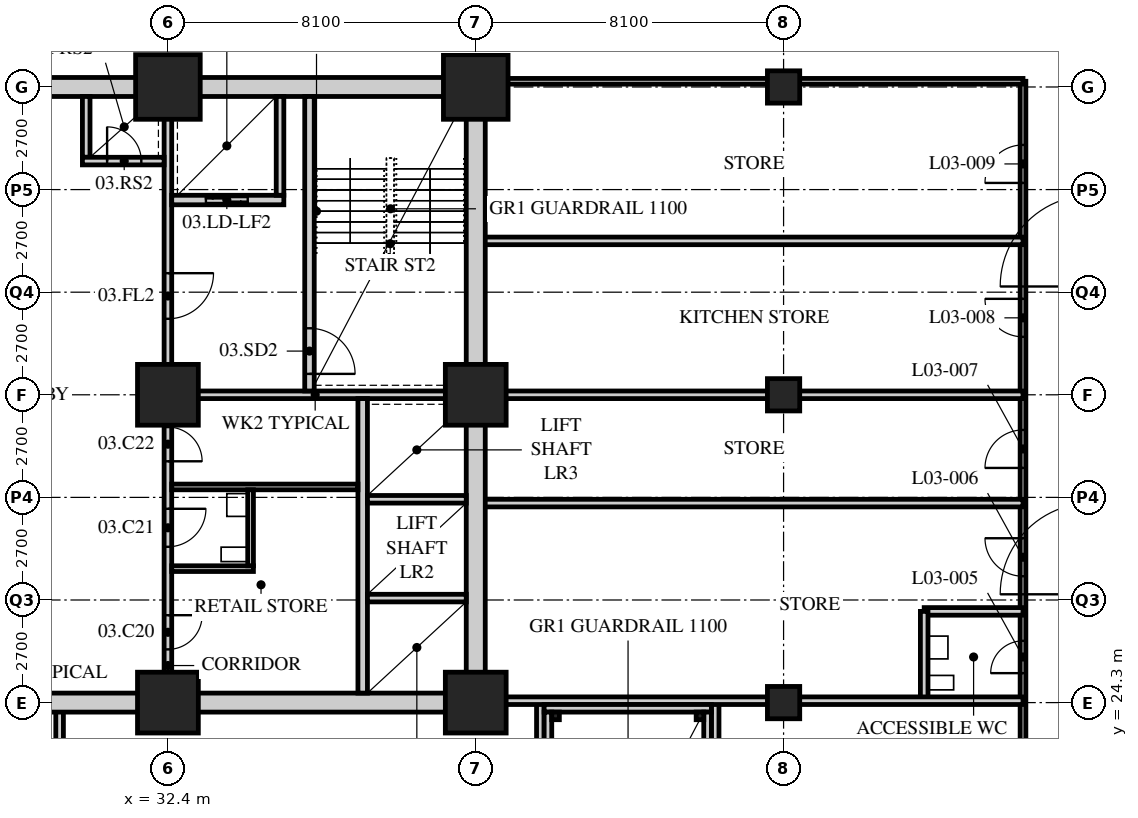
"""IFC4 building model, lengths in metres.
Left out: names, types, materials, properties, quantities, classifications, styles, units other than length and angle.
Written with IfcOpenShell. Run it as: python <this file> out.ifc"""

import sys

from ifc_helpers import new_model, si_unit, direction, frame, frame_2d, origin, origin_2d, place, context, subcontext, project, spatial, rectangle, hollow_rectangle, extrude, element, fill, save


model = new_model("IFC4")
c1 = context("Model", 3, precision=1e-05, world=origin(), true_north=direction((0.0, 1.0)))
c2 = subcontext(c1, "Body", "Model", "MODEL_VIEW")
j1 = project(units=[si_unit("LENGTHUNIT", "METRE"), si_unit("PLANEANGLEUNIT", "RADIAN")], contexts=[c1])
p1 = place(None, origin())
s1 = spatial("IfcSite", under=j1, at=p1, CompositionType="ELEMENT")
p2 = place(p1, origin())
s2 = spatial("IfcBuilding", under=s1, at=p2, CompositionType="ELEMENT")
p3 = place(p2, frame((0.0, 0.0, 16.8)))
s3 = spatial("IfcBuildingStorey", under=s2, at=p3, CompositionType="ELEMENT", Elevation=16.8)
for number, where, z_axis, x_axis in (
    (1, (32.4, 24.3, 0.0), (0.0, 0.0, 1.0), (1.0, 0.0, 0.0)),
    (2, (32.4, 32.4, 0.0), (0.0, 0.0, 1.0), (1.0, 0.0, 0.0)),
):
    element("IfcColumn", number, at=place(p3, frame(where, z_axis=z_axis, x_axis=x_axis)), inside=s3, PredefinedType="COLUMN", context=c2, shape_type="SweptSolid", body=[
        extrude(hollow_rectangle(XDim=1.6, YDim=1.6, WallThickness=0.15, at=origin_2d()), origin(), (0.0, 0.0, 1.0), 5.4),
    ])
p4 = place(p3, frame((32.4, 40.5, 0.0), z_axis=(0.0, 0.0, 1.0), x_axis=(1.0, 0.0, 0.0)))
e3 = element("IfcColumn", 3, at=p4, inside=s3, PredefinedType="COLUMN", context=c2, shape_type="SweptSolid", body=[
    extrude(hollow_rectangle(XDim=1.7, YDim=1.7, WallThickness=0.16, at=origin_2d()), origin(), (0.0, 0.0, 1.0), 5.4),
])
for number, where, z_axis, x_axis in (
    (4, (40.5, 24.3, 0.0), (0.0, 0.0, 1.0), (1.0, 0.0, 0.0)),
    (5, (40.5, 32.4, 0.0), (0.0, 0.0, 1.0), (1.0, 0.0, 0.0)),
):
    element("IfcColumn", number, at=place(p3, frame(where, z_axis=z_axis, x_axis=x_axis)), inside=s3, PredefinedType="COLUMN", context=c2, shape_type="SweptSolid", body=[
        extrude(hollow_rectangle(XDim=1.6, YDim=1.6, WallThickness=0.15, at=origin_2d()), origin(), (0.0, 0.0, 1.0), 5.4),
    ])
p5 = place(p3, frame((40.5, 40.5, 0.0), z_axis=(0.0, 0.0, 1.0), x_axis=(1.0, 0.0, 0.0)))
e6 = element("IfcColumn", 6, at=p5, inside=s3, PredefinedType="COLUMN", context=c2, shape_type="SweptSolid", body=[
    extrude(hollow_rectangle(XDim=1.7, YDim=1.7, WallThickness=0.16, at=origin_2d()), origin(), (0.0, 0.0, 1.0), 5.4),
])
for number, where, z_axis, x_axis in (
    (7, (48.6, 24.3, 0.0), (0.0, 0.0, 1.0), (1.0, 0.0, 0.0)),
    (8, (48.6, 32.4, 0.0), (0.0, 0.0, 1.0), (1.0, 0.0, 0.0)),
    (9, (48.6, 40.5, 0.0), (0.0, 0.0, 1.0), (1.0, 0.0, 0.0)),
):
    element("IfcColumn", number, at=place(p3, frame(where, z_axis=z_axis, x_axis=x_axis)), inside=s3, PredefinedType="COLUMN", context=c2, shape_type="SweptSolid", body=[
        extrude(hollow_rectangle(XDim=0.85, YDim=0.85, WallThickness=0.085, at=origin_2d()), origin(), (0.0, 0.0, 1.0), 5.4),
    ])
p6 = place(p3, frame((54.9, 9.9, 0.0), z_axis=(0.0, 0.0, 1.0), x_axis=(0.0, 1.0, 0.0)))
e10 = element("IfcWall", 10, at=p6, inside=s3, PredefinedType="PARTITIONING", context=c2, shape_type="SweptSolid", body=[
    extrude(rectangle(XDim=30.75, YDim=0.15, at=frame_2d((15.375, 0.0))), origin(), (0.0, 0.0, 1.0), 5.15),
])
p7 = place(p6, frame((15.175, 0.0, 0.0)))
e11 = element("IfcOpeningElement", 11, at=p7, cuts=e10, PredefinedType="OPENING", context=c2, shape_type="SweptSolid", body=[
    extrude(rectangle(XDim=0.85, YDim=2.1, at=frame_2d((0.425, 1.05))), frame((0.0, 0.085, 0.0), z_axis=(0.0, -1.0, 0.0), x_axis=(1.0, 0.0, 0.0)), (0.0, 0.0, 1.0), 0.17),
])
p8 = place(p6, frame((17.725, 0.0, 0.0)))
e12 = element("IfcOpeningElement", 12, at=p8, cuts=e10, PredefinedType="OPENING", context=c2, shape_type="SweptSolid", body=[
    extrude(rectangle(XDim=1.0, YDim=2.1, at=frame_2d((0.5, 1.05))), frame((0.0, 0.085, 0.0), z_axis=(0.0, -1.0, 0.0), x_axis=(1.0, 0.0, 0.0)), (0.0, 0.0, 1.0), 0.17),
])
p9 = place(p6, frame((20.575, 0.0, 0.0)))
e13 = element("IfcOpeningElement", 13, at=p9, cuts=e10, PredefinedType="OPENING", context=c2, shape_type="SweptSolid", body=[
    extrude(rectangle(XDim=1.0, YDim=2.1, at=frame_2d((0.5, 1.05))), frame((0.0, 0.085, 0.0), z_axis=(0.0, -1.0, 0.0), x_axis=(1.0, 0.0, 0.0)), (0.0, 0.0, 1.0), 0.17),
])
p10 = place(p6, frame((24.025, 0.0, 0.0)))
e14 = element("IfcOpeningElement", 14, at=p10, cuts=e10, PredefinedType="OPENING", context=c2, shape_type="SweptSolid", body=[
    extrude(rectangle(XDim=1.0, YDim=2.1, at=frame_2d((0.5, 1.05))), frame((0.0, 0.085, 0.0), z_axis=(0.0, -1.0, 0.0), x_axis=(1.0, 0.0, 0.0)), (0.0, 0.0, 1.0), 0.17),
])
p11 = place(p6, frame((28.075, 0.0, 0.0)))
e15 = element("IfcOpeningElement", 15, at=p11, cuts=e10, PredefinedType="OPENING", context=c2, shape_type="SweptSolid", body=[
    extrude(rectangle(XDim=1.0, YDim=2.1, at=frame_2d((0.5, 1.05))), frame((0.0, 0.085, 0.0), z_axis=(0.0, -1.0, 0.0), x_axis=(1.0, 0.0, 0.0)), (0.0, 0.0, 1.0), 0.17),
])
p12 = place(p3, frame((54.9, 40.65, 0.0), z_axis=(0.0, 0.0, 1.0), x_axis=(-1.0, 0.0, 0.0)))
e16 = element("IfcWall", 16, at=p12, inside=s3, PredefinedType="PARTITIONING", context=c2, shape_type="SweptSolid", body=[
    extrude(rectangle(XDim=14.268, YDim=0.15, at=frame_2d((7.134, 0.0))), origin(), (0.0, 0.0, 1.0), 4.538),
])
p13 = place(p3, frame((40.5, 32.4, 0.0), z_axis=(0.0, 0.0, 1.0), x_axis=(1.0, 0.0, 0.0)))
e17 = element("IfcWall", 17, at=p13, inside=s3, PredefinedType="SOLIDWALL", context=c2, shape_type="SweptSolid", body=[
    extrude(rectangle(XDim=14.4, YDim=0.2, at=frame_2d((7.2, 0.0))), origin(), (0.0, 0.0, 1.0), 4.538),
])
p14 = place(p3, frame((54.9, 26.7, 0.0), z_axis=(0.0, 0.0, 1.0), x_axis=(-1.0, 0.0, 0.0)))
e18 = element("IfcWall", 18, at=p14, inside=s3, PredefinedType="SOLIDWALL", context=c2, shape_type="SweptSolid", body=[
    extrude(rectangle(XDim=2.6, YDim=0.2, at=frame_2d((1.3, 0.0))), origin(), (0.0, 0.0, 1.0), 5.15),
])
p15 = place(p3, frame((52.3, 24.3, 0.0), z_axis=(0.0, 0.0, 1.0), x_axis=(0.0, 1.0, 0.0)))
e19 = element("IfcWall", 19, at=p15, inside=s3, PredefinedType="SOLIDWALL", context=c2, shape_type="SweptSolid", body=[
    extrude(rectangle(XDim=2.4, YDim=0.2, at=frame_2d((1.2, 0.0))), origin(), (0.0, 0.0, 1.0), 5.15),
])
for number, where, z_axis, x_axis in (
    (20, (54.9, 29.55, 0.0), (0.0, 0.0, 1.0), (-1.0, 0.0, 0.0)),
    (21, (54.9, 36.45, 0.0), (0.0, 0.0, 1.0), (-1.0, 0.0, 0.0)),
):
    element("IfcWall", number, at=place(p3, frame(where, z_axis=z_axis, x_axis=x_axis)), inside=s3, PredefinedType="SOLIDWALL", context=c2, shape_type="SweptSolid", body=[
        extrude(rectangle(XDim=14.4, YDim=0.2, at=frame_2d((7.2, 0.0))), origin(), (0.0, 0.0, 1.0), 5.15),
    ])
for number, where, z_axis, x_axis in (
    (22, (42.2, 9.9, 0.0), (0.0, 0.0, 1.0), (0.0, 1.0, 0.0)),
    (23, (46.8, 9.9, 0.0), (0.0, 0.0, 1.0), (0.0, 1.0, 0.0)),
    (24, (29.55, 9.9, 0.0), (0.0, 0.0, 1.0), (0.0, 1.0, 0.0)),
):
    element("IfcWall", number, at=place(p3, frame(where, z_axis=z_axis, x_axis=x_axis)), inside=s3, PredefinedType="SOLIDWALL", context=c2, shape_type="SweptSolid", body=[
        extrude(rectangle(XDim=14.4, YDim=0.2, at=frame_2d((7.2, 0.0))), origin(), (0.0, 0.0, 1.0), 5.15),
    ])
p16 = place(p3, frame((40.5, 24.35, 0.0), z_axis=(0.0, 0.0, 1.0), x_axis=(1.0, 0.0, 0.0)))
e25 = element("IfcWall", 25, at=p16, inside=s3, PredefinedType="SOLIDWALL", context=c2, shape_type="SweptSolid", body=[
    extrude(rectangle(XDim=14.4, YDim=0.2, at=frame_2d((7.2, 0.0))), origin(), (0.0, 0.0, 1.0), 4.538),
])
p17 = place(p3, frame((15.95, 24.3, 0.0), z_axis=(0.0, 0.0, 1.0), x_axis=(1.0, 0.0, 0.0)))
e26 = element("IfcWall", 26, at=p17, inside=s3, PredefinedType="SOLIDWALL", context=c2, shape_type="SweptSolid", body=[
    extrude(rectangle(XDim=24.8, YDim=0.5, at=frame_2d((12.4, 0.0))), origin(), (0.0, 0.0, 1.0), 4.5),
])
p18 = place(p17, frame((11.5, 0.0, 0.0)))
e27 = element("IfcOpeningElement", 27, at=p18, cuts=e26, PredefinedType="OPENING", context=c2, shape_type="SweptSolid", body=[
    extrude(rectangle(XDim=1.8, YDim=2.4, at=frame_2d((0.9, 1.2))), frame((0.0, 0.26, 0.0), z_axis=(0.0, -1.0, 0.0), x_axis=(1.0, 0.0, 0.0)), (0.0, 0.0, 1.0), 0.52),
])
p19 = place(p3, frame((15.95, 40.5, 0.0), z_axis=(0.0, 0.0, 1.0), x_axis=(1.0, 0.0, 0.0)))
e28 = element("IfcWall", 28, at=p19, inside=s3, PredefinedType="SOLIDWALL", context=c2, shape_type="SweptSolid", body=[
    extrude(rectangle(XDim=24.8, YDim=0.5, at=frame_2d((12.4, 0.0))), origin(), (0.0, 0.0, 1.0), 4.5),
])
p20 = place(p19, frame((11.5, 0.0, 0.0)))
e29 = element("IfcOpeningElement", 29, at=p20, cuts=e28, PredefinedType="OPENING", context=c2, shape_type="SweptSolid", body=[
    extrude(rectangle(XDim=1.8, YDim=2.4, at=frame_2d((0.9, 1.2))), frame((0.0, 0.26, 0.0), z_axis=(0.0, -1.0, 0.0), x_axis=(1.0, 0.0, 0.0)), (0.0, 0.0, 1.0), 0.52),
])
p21 = place(p3, frame((40.5, 24.55, 0.0), z_axis=(0.0, 0.0, 1.0), x_axis=(0.0, 1.0, 0.0)))
e30 = element("IfcWall", 30, at=p21, inside=s3, PredefinedType="SOLIDWALL", context=c2, shape_type="SweptSolid", body=[
    extrude(rectangle(XDim=15.7, YDim=0.5, at=frame_2d((7.85, 0.0))), origin(), (0.0, 0.0, 1.0), 4.538),
])
p22 = place(p3, frame((32.3, 32.4, 0.0), z_axis=(0.0, 0.0, 1.0), x_axis=(1.0, 0.0, 0.0)))
e31 = element("IfcWall", 31, at=p22, inside=s3, PredefinedType="SOLIDWALL", context=c2, shape_type="SweptSolid", body=[
    extrude(rectangle(XDim=7.95, YDim=0.2, at=frame_2d((3.975, 0.0))), origin(), (0.0, 0.0, 1.0), 4.45),
])
p23 = place(p3, frame((32.4, 32.5, 0.0), z_axis=(0.0, 0.0, 1.0), x_axis=(0.0, 1.0, 0.0)))
e32 = element("IfcWall", 32, at=p23, inside=s3, PredefinedType="SOLIDWALL", context=c2, shape_type="SweptSolid", body=[
    extrude(rectangle(XDim=7.75, YDim=0.2, at=frame_2d((3.875, 0.0))), origin(), (0.0, 0.0, 1.0), 4.45),
])
p24 = place(p23, frame((1.9, 0.0, 0.0)))
e33 = element("IfcOpeningElement", 33, at=p24, cuts=e32, PredefinedType="OPENING", context=c2, shape_type="SweptSolid", body=[
    extrude(rectangle(XDim=1.2, YDim=2.1, at=frame_2d((0.6, 1.05))), frame((0.0, 0.11, 0.0), z_axis=(0.0, -1.0, 0.0), x_axis=(1.0, 0.0, 0.0)), (0.0, 0.0, 1.0), 0.22),
])
p25 = place(p3, frame((37.525, 24.55, 0.0), z_axis=(0.0, 0.0, 1.0), x_axis=(0.0, 1.0, 0.0)))
e34 = element("IfcWall", 34, at=p25, inside=s3, PredefinedType="SOLIDWALL", context=c2, shape_type="SweptSolid", body=[
    extrude(rectangle(XDim=7.75, YDim=0.25, at=frame_2d((3.875, 0.0))), origin(), (0.0, 0.0, 1.0), 5.15),
])
for number, where, z_axis, x_axis in (
    (35, (37.65, 27.05, 0.0), (0.0, 0.0, 1.0), (1.0, 0.0, 0.0)),
    (36, (37.65, 29.65, 0.0), (0.0, 0.0, 1.0), (1.0, 0.0, 0.0)),
):
    element("IfcWall", number, at=place(p3, frame(where, z_axis=z_axis, x_axis=x_axis)), inside=s3, PredefinedType="SOLIDWALL", context=c2, shape_type="SweptSolid", body=[
        extrude(rectangle(XDim=2.6, YDim=0.2, at=frame_2d((1.3, 0.0))), origin(), (0.0, 0.0, 1.0), 5.15),
    ])
p26 = place(p3, frame((36.125, 32.5, 0.0), z_axis=(0.0, 0.0, 1.0), x_axis=(0.0, 1.0, 0.0)))
e37 = element("IfcWall", 37, at=p26, inside=s3, PredefinedType="SOLIDWALL", context=c2, shape_type="SweptSolid", body=[
    extrude(rectangle(XDim=7.75, YDim=0.25, at=frame_2d((3.875, 0.0))), origin(), (0.0, 0.0, 1.0), 5.15),
])
p27 = place(p26, frame((0.45, 0.0, 0.0)))
e38 = element("IfcOpeningElement", 38, at=p27, cuts=e37, PredefinedType="OPENING", context=c2, shape_type="SweptSolid", body=[
    extrude(rectangle(XDim=1.2, YDim=2.1, at=frame_2d((0.6, 1.05))), frame((0.0, 0.135, 0.0), z_axis=(0.0, -1.0, 0.0), x_axis=(1.0, 0.0, 0.0)), (0.0, 0.0, 1.0), 0.27),
])
p28 = place(p3, frame((32.5, 37.525, 0.0), z_axis=(0.0, 0.0, 1.0), x_axis=(1.0, 0.0, 0.0)))
e39 = element("IfcWall", 39, at=p28, inside=s3, PredefinedType="SOLIDWALL", context=c2, shape_type="SweptSolid", body=[
    extrude(rectangle(XDim=2.95, YDim=0.25, at=frame_2d((1.475, 0.0))), origin(), (0.0, 0.0, 1.0), 5.15),
])
p29 = place(p28, frame((0.9, 0.0, 0.0)))
e40 = element("IfcOpeningElement", 40, at=p29, cuts=e39, PredefinedType="OPENING", context=c2, shape_type="SweptSolid", body=[
    extrude(rectangle(XDim=1.1, YDim=2.4, at=frame_2d((0.55, 1.2))), frame((0.0, 0.135, 0.0), z_axis=(0.0, -1.0, 0.0), x_axis=(1.0, 0.0, 0.0)), (0.0, 0.0, 1.0), 0.27),
])
p30 = place(p3, frame((35.35, 37.65, 0.0), z_axis=(0.0, 0.0, 1.0), x_axis=(0.0, 1.0, 0.0)))
e41 = element("IfcWall", 41, at=p30, inside=s3, PredefinedType="SOLIDWALL", context=c2, shape_type="SweptSolid", body=[
    extrude(rectangle(XDim=2.6, YDim=0.2, at=frame_2d((1.3, 0.0))), origin(), (0.0, 0.0, 1.0), 5.15),
])
p31 = place(p3, frame((30.25, 38.65, 0.0), z_axis=(0.0, 0.0, 1.0), x_axis=(0.0, 1.0, 0.0)))
e42 = element("IfcWall", 42, at=p31, inside=s3, PredefinedType="SOLIDWALL", context=c2, shape_type="SweptSolid", body=[
    extrude(rectangle(XDim=1.6, YDim=0.2, at=frame_2d((0.8, 0.0))), origin(), (0.0, 0.0, 1.0), 5.15),
])
p32 = place(p3, frame((30.15, 38.55, 0.0), z_axis=(0.0, 0.0, 1.0), x_axis=(1.0, 0.0, 0.0)))
e43 = element("IfcWall", 43, at=p32, inside=s3, PredefinedType="SOLIDWALL", context=c2, shape_type="SweptSolid", body=[
    extrude(rectangle(XDim=2.15, YDim=0.2, at=frame_2d((1.075, 0.0))), origin(), (0.0, 0.0, 1.0), 5.15),
])
p33 = place(p32, frame((0.65, 0.0, 0.0)))
e44 = element("IfcOpeningElement", 44, at=p33, cuts=e43, PredefinedType="OPENING", context=c2, shape_type="SweptSolid", body=[
    extrude(rectangle(XDim=0.9, YDim=2.1, at=frame_2d((0.45, 1.05))), frame((0.0, 0.11, 0.0), z_axis=(0.0, -1.0, 0.0), x_axis=(1.0, 0.0, 0.0)), (0.0, 0.0, 1.0), 0.22),
])
p34 = place(p3, frame((32.4, 24.55, 0.0), z_axis=(0.0, 0.0, 1.0), x_axis=(0.0, 1.0, 0.0)))
e45 = element("IfcWall", 45, at=p34, inside=s3, PredefinedType="PARTITIONING", context=c2, shape_type="SweptSolid", body=[
    extrude(rectangle(XDim=7.75, YDim=0.2, at=frame_2d((3.875, 0.0))), origin(), (0.0, 0.0, 1.0), 4.45),
])
p35 = place(p34, frame((1.15, 0.0, 0.0)))
e46 = element("IfcOpeningElement", 46, at=p35, cuts=e45, PredefinedType="OPENING", context=c2, shape_type="SweptSolid", body=[
    extrude(rectangle(XDim=0.9, YDim=2.1, at=frame_2d((0.45, 1.05))), frame((0.0, 0.11, 0.0), z_axis=(0.0, -1.0, 0.0), x_axis=(1.0, 0.0, 0.0)), (0.0, 0.0, 1.0), 0.22),
])
p36 = place(p34, frame((3.85, 0.0, 0.0)))
e47 = element("IfcOpeningElement", 47, at=p36, cuts=e45, PredefinedType="OPENING", context=c2, shape_type="SweptSolid", body=[
    extrude(rectangle(XDim=1.0, YDim=2.1, at=frame_2d((0.5, 1.05))), frame((0.0, 0.11, 0.0), z_axis=(0.0, -1.0, 0.0), x_axis=(1.0, 0.0, 0.0)), (0.0, 0.0, 1.0), 0.22),
])
p37 = place(p34, frame((6.1, 0.0, 0.0)))
e48 = element("IfcOpeningElement", 48, at=p37, cuts=e45, PredefinedType="OPENING", context=c2, shape_type="SweptSolid", body=[
    extrude(rectangle(XDim=0.9, YDim=2.1, at=frame_2d((0.45, 1.05))), frame((0.0, 0.11, 0.0), z_axis=(0.0, -1.0, 0.0), x_axis=(1.0, 0.0, 0.0)), (0.0, 0.0, 1.0), 0.22),
])
p38 = place(p3, frame((32.5, 27.825, 0.0), z_axis=(0.0, 0.0, 1.0), x_axis=(1.0, 0.0, 0.0)))
e49 = element("IfcWall", 49, at=p38, inside=s3, PredefinedType="PARTITIONING", context=c2, shape_type="SweptSolid", body=[
    extrude(rectangle(XDim=2.15, YDim=0.15, at=frame_2d((1.075, 0.0))), origin(), (0.0, 0.0, 1.0), 5.15),
])
p39 = place(p3, frame((32.5, 29.975, 0.0), z_axis=(0.0, 0.0, 1.0), x_axis=(1.0, 0.0, 0.0)))
e50 = element("IfcWall", 50, at=p39, inside=s3, PredefinedType="PARTITIONING", context=c2, shape_type="SweptSolid", body=[
    extrude(rectangle(XDim=4.9, YDim=0.15, at=frame_2d((2.45, 0.0))), origin(), (0.0, 0.0, 1.0), 5.15),
])
p40 = place(p3, frame((34.575, 27.9, 0.0), z_axis=(0.0, 0.0, 1.0), x_axis=(0.0, 1.0, 0.0)))
e51 = element("IfcWall", 51, at=p40, inside=s3, PredefinedType="PARTITIONING", context=c2, shape_type="SweptSolid", body=[
    extrude(rectangle(XDim=2.0, YDim=0.15, at=frame_2d((1.0, 0.0))), origin(), (0.0, 0.0, 1.0), 5.15),
])
p41 = place(p3, frame((42.3, 24.15, 0.0), z_axis=(0.0, 0.0, 1.0), x_axis=(1.0, 0.0, 0.0)))
e52 = element("IfcWall", 52, at=p41, inside=s3, PredefinedType="SOLIDWALL", context=c2, shape_type="SweptSolid", body=[
    extrude(rectangle(XDim=4.4, YDim=0.2, at=frame_2d((2.2, 0.0))), origin(), (0.0, 0.0, 1.0), 4.538),
])
for number, where, z_axis, x_axis in (
    (53, (42.4, 16.45, 0.0), (0.0, 0.0, 1.0), (0.0, 1.0, 0.0)),
    (54, (46.6, 16.45, 0.0), (0.0, 0.0, 1.0), (0.0, 1.0, 0.0)),
):
    element("IfcWall", number, at=place(p3, frame(where, z_axis=z_axis, x_axis=x_axis)), inside=s3, PredefinedType="SOLIDWALL", context=c2, shape_type="SweptSolid", body=[
        extrude(rectangle(XDim=7.6, YDim=0.2, at=frame_2d((3.8, 0.0))), origin(), (0.0, 0.0, 1.0), 5.15),
    ])
for number, where, z_axis, x_axis in (
    (55, (42.6, 23.95, 0.0), (0.0, 0.0, 1.0), (1.0, 0.0, 0.0)),
    (56, (46.4, 23.95, 0.0), (0.0, 0.0, 1.0), (1.0, 0.0, 0.0)),
):
    element("IfcColumn", number, at=place(p3, frame(where, z_axis=z_axis, x_axis=x_axis)), inside=s3, PredefinedType="COLUMN", context=c2, shape_type="SweptSolid", body=[
        extrude(hollow_rectangle(XDim=0.2, YDim=0.2, WallThickness=0.012, at=origin_2d()), origin(), (0.0, 0.0, 1.0), 5.4),
    ])
p42 = place(p7, origin())
e57 = element("IfcDoor", 57, at=p42, inside=s3, OperationType="SINGLE_SWING_LEFT", PredefinedType="DOOR", context=c2, shape_type="SweptSolid", body=[
    extrude(rectangle(XDim=0.85, YDim=2.1, at=frame_2d((0.425, 1.05))), frame((0.0, 0.025, 0.0), z_axis=(0.0, -1.0, 0.0), x_axis=(1.0, 0.0, 0.0)), (0.0, 0.0, 1.0), 0.05),
])
fill(e11, e57)
p43 = place(p8, origin())
e58 = element("IfcDoor", 58, at=p43, inside=s3, OperationType="SINGLE_SWING_RIGHT", PredefinedType="DOOR", context=c2, shape_type="SweptSolid", body=[
    extrude(rectangle(XDim=1.0, YDim=2.1, at=frame_2d((0.5, 1.05))), frame((0.0, 0.025, 0.0), z_axis=(0.0, -1.0, 0.0), x_axis=(1.0, 0.0, 0.0)), (0.0, 0.0, 1.0), 0.05),
])
fill(e12, e58)
p44 = place(p9, origin())
e59 = element("IfcDoor", 59, at=p44, inside=s3, OperationType="SINGLE_SWING_LEFT", PredefinedType="DOOR", context=c2, shape_type="SweptSolid", body=[
    extrude(rectangle(XDim=1.0, YDim=2.1, at=frame_2d((0.5, 1.05))), frame((0.0, 0.025, 0.0), z_axis=(0.0, -1.0, 0.0), x_axis=(1.0, 0.0, 0.0)), (0.0, 0.0, 1.0), 0.05),
])
fill(e13, e59)
p45 = place(p10, origin())
e60 = element("IfcDoor", 60, at=p45, inside=s3, OperationType="SINGLE_SWING_RIGHT", PredefinedType="DOOR", context=c2, shape_type="SweptSolid", body=[
    extrude(rectangle(XDim=1.0, YDim=2.1, at=frame_2d((0.5, 1.05))), frame((0.0, 0.025, 0.0), z_axis=(0.0, -1.0, 0.0), x_axis=(1.0, 0.0, 0.0)), (0.0, 0.0, 1.0), 0.05),
])
fill(e14, e60)
p46 = place(p11, origin())
e61 = element("IfcDoor", 61, at=p46, inside=s3, OperationType="SINGLE_SWING_LEFT", PredefinedType="DOOR", context=c2, shape_type="SweptSolid", body=[
    extrude(rectangle(XDim=1.0, YDim=2.1, at=frame_2d((0.5, 1.05))), frame((0.0, 0.025, 0.0), z_axis=(0.0, -1.0, 0.0), x_axis=(1.0, 0.0, 0.0)), (0.0, 0.0, 1.0), 0.05),
])
fill(e15, e61)
p47 = place(p35, origin())
e62 = element("IfcDoor", 62, at=p47, inside=s3, OperationType="SINGLE_SWING_LEFT", PredefinedType="DOOR", context=c2, shape_type="SweptSolid", body=[
    extrude(rectangle(XDim=0.9, YDim=2.1, at=frame_2d((0.45, 1.05))), frame((0.0, 0.025, 0.0), z_axis=(0.0, -1.0, 0.0), x_axis=(1.0, 0.0, 0.0)), (0.0, 0.0, 1.0), 0.05),
])
fill(e46, e62)
p48 = place(p36, origin())
e63 = element("IfcDoor", 63, at=p48, inside=s3, OperationType="SINGLE_SWING_LEFT", PredefinedType="DOOR", context=c2, shape_type="SweptSolid", body=[
    extrude(rectangle(XDim=1.0, YDim=2.1, at=frame_2d((0.5, 1.05))), frame((0.0, 0.025, 0.0), z_axis=(0.0, -1.0, 0.0), x_axis=(1.0, 0.0, 0.0)), (0.0, 0.0, 1.0), 0.05),
])
fill(e47, e63)
p49 = place(p37, origin())
e64 = element("IfcDoor", 64, at=p49, inside=s3, OperationType="SINGLE_SWING_RIGHT", PredefinedType="DOOR", context=c2, shape_type="SweptSolid", body=[
    extrude(rectangle(XDim=0.9, YDim=2.1, at=frame_2d((0.45, 1.05))), frame((0.0, 0.025, 0.0), z_axis=(0.0, -1.0, 0.0), x_axis=(1.0, 0.0, 0.0)), (0.0, 0.0, 1.0), 0.05),
])
fill(e48, e64)
p50 = place(p27, origin())
e65 = element("IfcDoor", 65, at=p50, inside=s3, OperationType="SINGLE_SWING_RIGHT", PredefinedType="DOOR", context=c2, shape_type="SweptSolid", body=[
    extrude(rectangle(XDim=1.2, YDim=2.1, at=frame_2d((0.6, 1.05))), frame((0.0, 0.025, 0.0), z_axis=(0.0, -1.0, 0.0), x_axis=(1.0, 0.0, 0.0)), (0.0, 0.0, 1.0), 0.05),
])
fill(e38, e65)
p51 = place(p24, origin())
e66 = element("IfcDoor", 66, at=p51, inside=s3, OperationType="SINGLE_SWING_LEFT", PredefinedType="DOOR", context=c2, shape_type="SweptSolid", body=[
    extrude(rectangle(XDim=1.2, YDim=2.1, at=frame_2d((0.6, 1.05))), frame((0.0, 0.025, 0.0), z_axis=(0.0, -1.0, 0.0), x_axis=(1.0, 0.0, 0.0)), (0.0, 0.0, 1.0), 0.05),
])
fill(e33, e66)
p52 = place(p33, origin())
e67 = element("IfcDoor", 67, at=p52, inside=s3, OperationType="SINGLE_SWING_LEFT", PredefinedType="DOOR", context=c2, shape_type="SweptSolid", body=[
    extrude(rectangle(XDim=0.9, YDim=2.1, at=frame_2d((0.45, 1.05))), frame((0.0, 0.025, 0.0), z_axis=(0.0, -1.0, 0.0), x_axis=(1.0, 0.0, 0.0)), (0.0, 0.0, 1.0), 0.05),
])
fill(e44, e67)
p53 = place(p29, origin())
e68 = element("IfcDoor", 68, at=p53, inside=s3, OperationType="DOUBLE_DOOR_SLIDING", PredefinedType="DOOR", context=c2, shape_type="SweptSolid", body=[
    extrude(rectangle(XDim=1.1, YDim=2.4, at=frame_2d((0.55, 1.2))), frame((0.0, 0.025, 0.0), z_axis=(0.0, -1.0, 0.0), x_axis=(1.0, 0.0, 0.0)), (0.0, 0.0, 1.0), 0.05),
])
fill(e40, e68)
save(model, sys.argv[1])
